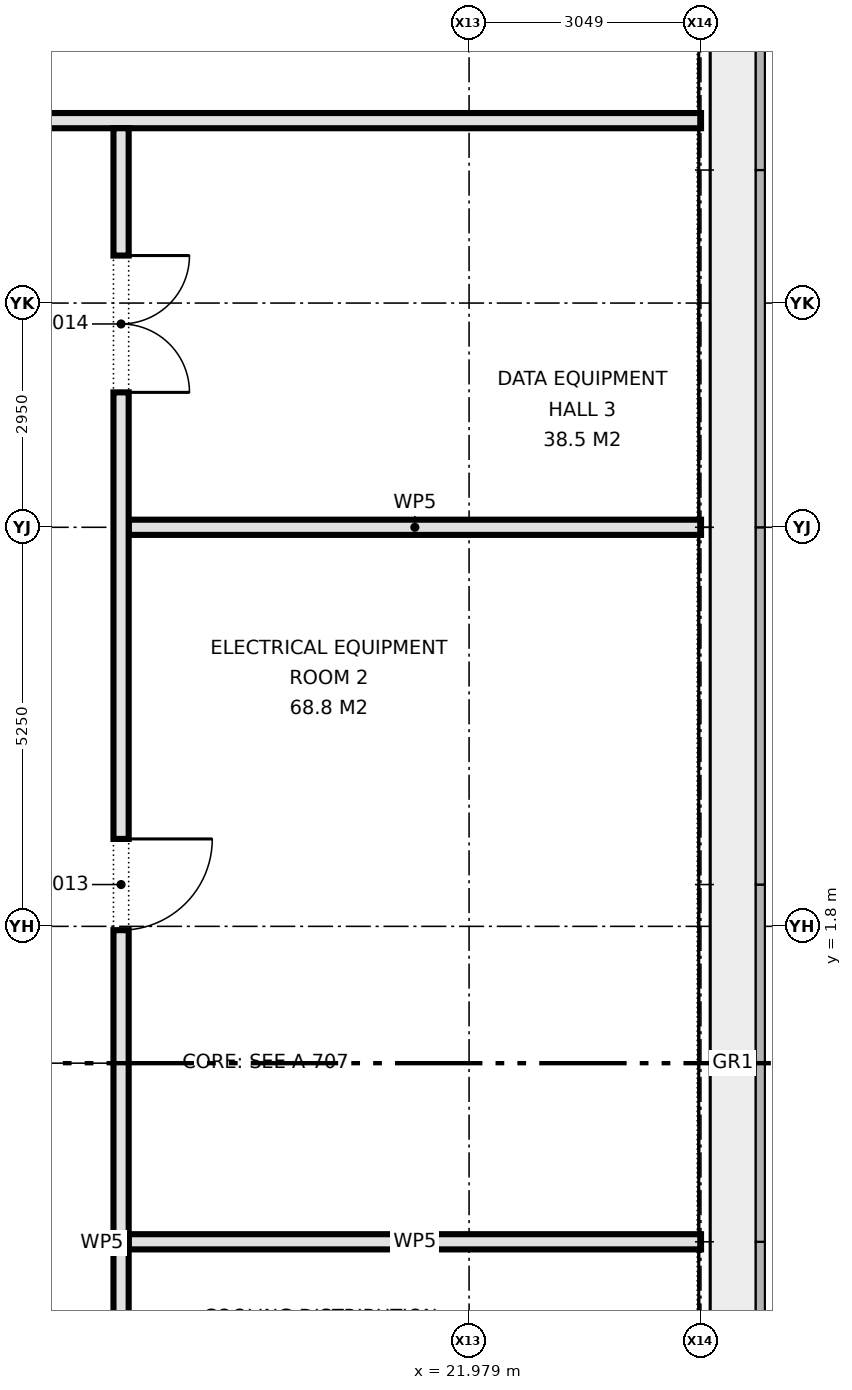
"""IFC4 building model, lengths in metres.
Left out: names, types, materials, properties, quantities, classifications, styles, units other than length and angle.
Written with IfcOpenShell. Run it as: python <this file> out.ifc"""

import sys

from ifc_helpers import new_model, si_unit, direction, frame, frame_2d, origin, place, context, subcontext, project, spatial, rectangle, extrude, element, fill, save


model = new_model("IFC4")
c1 = context("Model", 3, precision=1e-05, world=origin(), true_north=direction((0.0, 1.0)))
c2 = subcontext(c1, "Body", "Model", "MODEL_VIEW")
j1 = project(units=[si_unit("LENGTHUNIT", "METRE"), si_unit("PLANEANGLEUNIT", "RADIAN")], contexts=[c1])
p1 = place(None, origin())
s1 = spatial("IfcSite", under=j1, at=p1, CompositionType="ELEMENT")
p2 = place(p1, origin())
s2 = spatial("IfcBuilding", under=s1, at=p2, CompositionType="ELEMENT")
p3 = place(p2, frame((0.0, 0.0, 54.5)))
s3 = spatial("IfcBuildingStorey", under=s2, at=p3, CompositionType="ELEMENT", Elevation=54.5)
for number, where, z_axis, x_axis in (
    (1, (17.5, -2.35, 0.0), (0.0, 0.0, 1.0), (1.0, 0.0, 0.0)),
    (2, (17.5, 7.05, 0.0), (0.0, 0.0, 1.0), (1.0, 0.0, 0.0)),
):
    element("IfcWall", number, at=place(p3, frame(where, z_axis=z_axis, x_axis=x_axis)), inside=s3, PredefinedType="PARTITIONING", context=c2, shape_type="SweptSolid", body=[
        extrude(rectangle(XDim=7.53, YDim=0.2, at=frame_2d((3.765, 0.0))), origin(), (0.0, 0.0, 1.0), 4.575),
    ])
p4 = place(p3, frame((-25.03, 12.4, 0.0), z_axis=(0.0, 0.0, 1.0), x_axis=(1.0, 0.0, 0.0)))
e3 = element("IfcWall", 3, at=p4, inside=s3, PredefinedType="PARTITIONING", context=c2, shape_type="SweptSolid", body=[
    extrude(rectangle(XDim=50.06, YDim=0.2, at=frame_2d((25.03, 0.0))), origin(), (0.0, 0.0, 1.0), 4.575),
])
p5 = place(p4, frame((10.805, 0.0, 0.0)))
e4 = element("IfcOpeningElement", 4, at=p5, cuts=e3, PredefinedType="OPENING", context=c2, shape_type="SweptSolid", body=[
    extrude(rectangle(XDim=1.8, YDim=2.1, at=frame_2d((0.9, 1.05))), frame((0.0, 0.11, 0.0), z_axis=(0.0, -1.0, 0.0), x_axis=(1.0, 0.0, 0.0)), (0.0, 0.0, 1.0), 0.22),
])
p6 = place(p4, frame((8.28, 0.0, 0.0)))
e5 = element("IfcOpeningElement", 5, at=p6, cuts=e3, PredefinedType="OPENING", context=c2, shape_type="SweptSolid", body=[
    extrude(rectangle(XDim=1.2, YDim=2.1, at=frame_2d((0.6, 1.05))), frame((0.0, 0.11, 0.0), z_axis=(0.0, -1.0, 0.0), x_axis=(1.0, 0.0, 0.0)), (0.0, 0.0, 1.0), 0.22),
])
p7 = place(p4, frame((21.78, 0.0, 0.0)))
e6 = element("IfcOpeningElement", 6, at=p7, cuts=e3, PredefinedType="OPENING", context=c2, shape_type="SweptSolid", body=[
    extrude(rectangle(XDim=1.8, YDim=2.1, at=frame_2d((0.9, 1.05))), frame((0.0, 0.11, 0.0), z_axis=(0.0, -1.0, 0.0), x_axis=(1.0, 0.0, 0.0)), (0.0, 0.0, 1.0), 0.22),
])
p8 = place(p4, frame((36.36, 0.0, 0.0)))
e7 = element("IfcOpeningElement", 7, at=p8, cuts=e3, PredefinedType="OPENING", context=c2, shape_type="SweptSolid", body=[
    extrude(rectangle(XDim=1.8, YDim=2.1, at=frame_2d((0.9, 1.05))), frame((0.0, 0.11, 0.0), z_axis=(0.0, -1.0, 0.0), x_axis=(1.0, 0.0, 0.0)), (0.0, 0.0, 1.0), 0.22),
])
p9 = place(p3, frame((17.4, -12.3, 0.0), z_axis=(0.0, 0.0, 1.0), x_axis=(0.0, 1.0, 0.0)))
e8 = element("IfcWall", 8, at=p9, inside=s3, PredefinedType="PARTITIONING", context=c2, shape_type="SweptSolid", body=[
    extrude(rectangle(XDim=24.6, YDim=0.2, at=frame_2d((12.3, 0.0))), origin(), (0.0, 0.0, 1.0), 4.575),
])
p10 = place(p9, frame((4.025, 0.0, 0.0)))
e9 = element("IfcOpeningElement", 9, at=p10, cuts=e8, PredefinedType="OPENING", context=c2, shape_type="SweptSolid", body=[
    extrude(rectangle(XDim=1.8, YDim=2.1, at=frame_2d((0.9, 1.05))), frame((0.0, 0.11, 0.0), z_axis=(0.0, -1.0, 0.0), x_axis=(1.0, 0.0, 0.0)), (0.0, 0.0, 1.0), 0.22),
])
p11 = place(p9, frame((14.05, 0.0, 0.0)))
e10 = element("IfcOpeningElement", 10, at=p11, cuts=e8, PredefinedType="OPENING", context=c2, shape_type="SweptSolid", body=[
    extrude(rectangle(XDim=1.2, YDim=2.1, at=frame_2d((0.6, 1.05))), frame((0.0, 0.11, 0.0), z_axis=(0.0, -1.0, 0.0), x_axis=(1.0, 0.0, 0.0)), (0.0, 0.0, 1.0), 0.22),
])
p12 = place(p9, frame((21.125, 0.0, 0.0)))
e11 = element("IfcOpeningElement", 11, at=p12, cuts=e8, PredefinedType="OPENING", context=c2, shape_type="SweptSolid", body=[
    extrude(rectangle(XDim=1.8, YDim=2.1, at=frame_2d((0.9, 1.05))), frame((0.0, 0.11, 0.0), z_axis=(0.0, -1.0, 0.0), x_axis=(1.0, 0.0, 0.0)), (0.0, 0.0, 1.0), 0.22),
])
p13 = place(p11, frame((1.2, 0.0, 0.0), z_axis=(0.0, 0.0, 1.0), x_axis=(-1.0, 0.0, 0.0)))
e12 = element("IfcDoor", 12, at=p13, inside=s3, OperationType="SINGLE_SWING_LEFT", PredefinedType="DOOR", context=c2, shape_type="SweptSolid", body=[
    extrude(rectangle(XDim=1.2, YDim=2.1, at=frame_2d((0.6, 1.05))), frame((0.0, 0.025, 0.0), z_axis=(0.0, -1.0, 0.0), x_axis=(1.0, 0.0, 0.0)), (0.0, 0.0, 1.0), 0.05),
])
fill(e10, e12)
p14 = place(p12, frame((1.8, 0.0, 0.0), z_axis=(0.0, 0.0, 1.0), x_axis=(-1.0, 0.0, 0.0)))
e13 = element("IfcDoor", 13, at=p14, inside=s3, OperationType="DOUBLE_DOOR_SINGLE_SWING", PredefinedType="DOOR", context=c2, shape_type="SweptSolid", body=[
    extrude(rectangle(XDim=1.8, YDim=2.1, at=frame_2d((0.9, 1.05))), frame((0.0, 0.025, 0.0), z_axis=(0.0, -1.0, 0.0), x_axis=(1.0, 0.0, 0.0)), (0.0, 0.0, 1.0), 0.05),
])
fill(e11, e13)
save(model, sys.argv[1])
